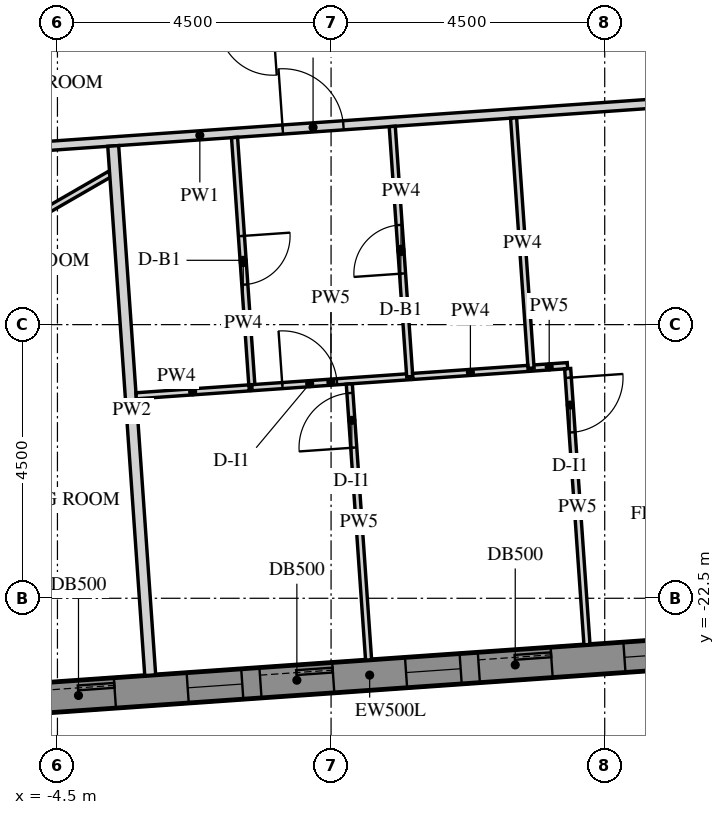
"""IFC4 building model, lengths in metres.
Left out: names, types, materials, properties, quantities, classifications, styles, units other than length and angle.
Written with IfcOpenShell. Run it as: python <this file> out.ifc"""

import sys

from ifc_helpers import new_model, si_unit, direction, frame, frame_2d, origin, place, context, subcontext, project, spatial, polyline, rectangle, outline, extrude, element, fill, save


model = new_model("IFC4")
c1 = context("Model", 3, precision=1e-05, world=origin(), true_north=direction((0.0, 1.0)))
c2 = subcontext(c1, "Body", "Model", "MODEL_VIEW")
j1 = project(units=[si_unit("LENGTHUNIT", "METRE"), si_unit("PLANEANGLEUNIT", "RADIAN")], contexts=[c1])
p1 = place(None, origin())
s1 = spatial("IfcSite", under=j1, at=p1, CompositionType="ELEMENT")
p2 = place(p1, origin())
s2 = spatial("IfcBuilding", under=s1, at=p2, CompositionType="ELEMENT")
p3 = place(p2, frame((0.0, 0.0, 314.7)))
s3 = spatial("IfcBuildingStorey", under=s2, at=p3, CompositionType="ELEMENT", Elevation=314.7)
p4 = place(p3, frame((-10.86, -24.567, -0.15), z_axis=(0.0, 0.0, 1.0), x_axis=(0.997564329317, 0.06975248292, 0.0)))
e1 = element("IfcWall", 1, at=p4, inside=s3, PredefinedType="SOLIDWALL", context=c2, shape_type="SweptSolid", body=[
    extrude(outline(polyline([(0.25, -0.25), (22.795, -0.25), (23.295, 0.25), (-0.25, 0.25), (0.25, -0.25)])), origin(), (0.0, 0.0, 1.0), 3.9),
])
p5 = place(p4, frame((1.323, 0.0, 1.05)))
e2 = element("IfcOpeningElement", 2, at=p5, cuts=e1, PredefinedType="OPENING", context=c2, shape_type="SweptSolid", body=[
    extrude(rectangle(XDim=0.9, YDim=1.5, at=frame_2d((0.45, 0.75))), frame((0.0, 0.26, 0.0), z_axis=(0.0, -1.0, 0.0), x_axis=(1.0, 0.0, 0.0)), (0.0, 0.0, 1.0), 0.52),
])
p6 = place(p4, frame((2.522, 0.0, 0.15)))
e3 = element("IfcOpeningElement", 3, at=p6, cuts=e1, PredefinedType="OPENING", context=c2, shape_type="SweptSolid", body=[
    extrude(rectangle(XDim=1.2, YDim=2.4, at=frame_2d((0.6, 1.2))), frame((0.0, 0.26, 0.0), z_axis=(0.0, -1.0, 0.0), x_axis=(1.0, 0.0, 0.0)), (0.0, 0.0, 1.0), 0.52),
])
p7 = place(p4, frame((4.922, 0.0, 1.05)))
e4 = element("IfcOpeningElement", 4, at=p7, cuts=e1, PredefinedType="OPENING", context=c2, shape_type="SweptSolid", body=[
    extrude(rectangle(XDim=0.9, YDim=1.5, at=frame_2d((0.45, 0.75))), frame((0.0, 0.26, 0.0), z_axis=(0.0, -1.0, 0.0), x_axis=(1.0, 0.0, 0.0)), (0.0, 0.0, 1.0), 0.52),
])
p8 = place(p4, frame((6.122, 0.0, 0.15)))
e5 = element("IfcOpeningElement", 5, at=p8, cuts=e1, PredefinedType="OPENING", context=c2, shape_type="SweptSolid", body=[
    extrude(rectangle(XDim=1.2, YDim=2.4, at=frame_2d((0.6, 1.2))), frame((0.0, 0.26, 0.0), z_axis=(0.0, -1.0, 0.0), x_axis=(1.0, 0.0, 0.0)), (0.0, 0.0, 1.0), 0.52),
])
p9 = place(p4, frame((8.522, 0.0, 1.05)))
e6 = element("IfcOpeningElement", 6, at=p9, cuts=e1, PredefinedType="OPENING", context=c2, shape_type="SweptSolid", body=[
    extrude(rectangle(XDim=0.9, YDim=1.5, at=frame_2d((0.45, 0.75))), frame((0.0, 0.26, 0.0), z_axis=(0.0, -1.0, 0.0), x_axis=(1.0, 0.0, 0.0)), (0.0, 0.0, 1.0), 0.52),
])
p10 = place(p4, frame((9.722, 0.0, 0.15)))
e7 = element("IfcOpeningElement", 7, at=p10, cuts=e1, PredefinedType="OPENING", context=c2, shape_type="SweptSolid", body=[
    extrude(rectangle(XDim=1.2, YDim=2.4, at=frame_2d((0.6, 1.2))), frame((0.0, 0.26, 0.0), z_axis=(0.0, -1.0, 0.0), x_axis=(1.0, 0.0, 0.0)), (0.0, 0.0, 1.0), 0.52),
])
p11 = place(p4, frame((12.122, 0.0, 1.05)))
e8 = element("IfcOpeningElement", 8, at=p11, cuts=e1, PredefinedType="OPENING", context=c2, shape_type="SweptSolid", body=[
    extrude(rectangle(XDim=0.9, YDim=1.5, at=frame_2d((0.45, 0.75))), frame((0.0, 0.26, 0.0), z_axis=(0.0, -1.0, 0.0), x_axis=(1.0, 0.0, 0.0)), (0.0, 0.0, 1.0), 0.52),
])
p12 = place(p4, frame((13.323, 0.0, 0.15)))
e9 = element("IfcOpeningElement", 9, at=p12, cuts=e1, PredefinedType="OPENING", context=c2, shape_type="SweptSolid", body=[
    extrude(rectangle(XDim=1.2, YDim=2.4, at=frame_2d((0.6, 1.2))), frame((0.0, 0.26, 0.0), z_axis=(0.0, -1.0, 0.0), x_axis=(1.0, 0.0, 0.0)), (0.0, 0.0, 1.0), 0.52),
])
p13 = place(p4, frame((15.722, 0.0, 1.05)))
e10 = element("IfcOpeningElement", 10, at=p13, cuts=e1, PredefinedType="OPENING", context=c2, shape_type="SweptSolid", body=[
    extrude(rectangle(XDim=0.9, YDim=1.5, at=frame_2d((0.45, 0.75))), frame((0.0, 0.26, 0.0), z_axis=(0.0, -1.0, 0.0), x_axis=(1.0, 0.0, 0.0)), (0.0, 0.0, 1.0), 0.52),
])
p14 = place(p4, frame((16.922, 0.0, 0.15)))
e11 = element("IfcOpeningElement", 11, at=p14, cuts=e1, PredefinedType="OPENING", context=c2, shape_type="SweptSolid", body=[
    extrude(rectangle(XDim=1.2, YDim=2.4, at=frame_2d((0.6, 1.2))), frame((0.0, 0.26, 0.0), z_axis=(0.0, -1.0, 0.0), x_axis=(1.0, 0.0, 0.0)), (0.0, 0.0, 1.0), 0.52),
])
p15 = place(p4, frame((19.323, 0.0, 1.05)))
e12 = element("IfcOpeningElement", 12, at=p15, cuts=e1, PredefinedType="OPENING", context=c2, shape_type="SweptSolid", body=[
    extrude(rectangle(XDim=0.9, YDim=1.5, at=frame_2d((0.45, 0.75))), frame((0.0, 0.26, 0.0), z_axis=(0.0, -1.0, 0.0), x_axis=(1.0, 0.0, 0.0)), (0.0, 0.0, 1.0), 0.52),
])
p16 = place(p4, frame((20.522, 0.0, 0.15)))
e13 = element("IfcOpeningElement", 13, at=p16, cuts=e1, PredefinedType="OPENING", context=c2, shape_type="SweptSolid", body=[
    extrude(rectangle(XDim=1.2, YDim=2.4, at=frame_2d((0.6, 1.2))), frame((0.0, 0.26, 0.0), z_axis=(0.0, -1.0, 0.0), x_axis=(1.0, 0.0, 0.0)), (0.0, 0.0, 1.0), 0.52),
])
p17 = place(p3, frame((-10.274, -15.454, 0.0), z_axis=(0.0, 0.0, 1.0), x_axis=(0.997564284069, 0.069753130035, 0.0)))
e14 = element("IfcWall", 14, at=p17, inside=s3, PredefinedType="PARTITIONING", context=c2, shape_type="SweptSolid", body=[
    extrude(rectangle(XDim=16.272, YDim=0.15, at=frame_2d((8.136, 0.0))), origin(), (0.0, 0.0, 1.0), 2.988),
])
p18 = place(p17, frame((9.503, 0.0, 0.0)))
e15 = element("IfcOpeningElement", 15, at=p18, cuts=e14, PredefinedType="OPENING", context=c2, shape_type="SweptSolid", body=[
    extrude(rectangle(XDim=1.0, YDim=2.1, at=frame_2d((0.5, 1.05))), frame((0.0, 0.085, 0.0), z_axis=(0.0, -1.0, 0.0), x_axis=(1.0, 0.0, 0.0)), (0.0, 0.0, 1.0), 0.17),
])
p19 = place(p3, frame((6.551, -12.473, 0.0), z_axis=(0.0, 0.0, 1.0), x_axis=(-0.997563421853, -0.069765459797, 0.0)))
e16 = element("IfcWall", 16, at=p19, inside=s3, PredefinedType="PARTITIONING", context=c2, shape_type="SweptSolid", body=[
    extrude(rectangle(XDim=15.95, YDim=0.15, at=frame_2d((7.975, 0.0))), origin(), (0.0, 0.0, 1.0), 2.988),
])
p20 = place(p19, frame((7.525, 0.0, 0.0)))
e17 = element("IfcOpeningElement", 17, at=p20, cuts=e16, PredefinedType="OPENING", context=c2, shape_type="SweptSolid", body=[
    extrude(rectangle(XDim=0.9, YDim=2.1, at=frame_2d((0.45, 1.05))), frame((0.0, 0.085, 0.0), z_axis=(0.0, -1.0, 0.0), x_axis=(1.0, 0.0, 0.0)), (0.0, 0.0, 1.0), 0.17),
])
p21 = place(p3, frame((-3.641, -15.525, 0.0), z_axis=(0.0, 0.0, 1.0), x_axis=(-0.866026229868, -0.499998569178, 0.0)))
e18 = element("IfcWall", 18, at=p21, inside=s3, PredefinedType="PARTITIONING", context=c2, shape_type="SweptSolid", body=[
    extrude(rectangle(XDim=9.185, YDim=0.1, at=frame_2d((4.592, 0.0))), origin(), (0.0, 0.0, 1.0), 2.988),
])
p22 = place(p3, frame((-2.974, -23.765, 0.0), z_axis=(0.0, 0.0, 1.0), x_axis=(-0.06975756604, 0.997563973878, 0.0)))
e19 = element("IfcWall", 19, at=p22, inside=s3, PredefinedType="PARTITIONING", context=c2, shape_type="SweptSolid", body=[
    extrude(rectangle(XDim=8.725, YDim=0.18, at=frame_2d((4.363, 0.0))), origin(), (0.0, 0.0, 1.0), 2.988),
])
p23 = place(p3, frame((3.287, -18.716, 0.0), z_axis=(0.0, 0.0, 1.0), x_axis=(0.997564613391, 0.069748420123, 0.0)))
e20 = element("IfcWall", 20, at=p23, inside=s3, PredefinedType="PARTITIONING", context=c2, shape_type="SweptSolid", body=[
    extrude(rectangle(XDim=0.602, YDim=0.1, at=frame_2d((0.301, 0.0))), origin(), (0.0, 0.0, 1.0), 2.988),
])
p24 = place(p3, frame((3.891, -18.724, 0.0), z_axis=(0.0, 0.0, 1.0), x_axis=(0.06975224022, -0.997564346288, 0.0)))
e21 = element("IfcWall", 21, at=p24, inside=s3, PredefinedType="PARTITIONING", context=c2, shape_type="SweptSolid", body=[
    extrude(rectangle(XDim=4.55, YDim=0.1, at=frame_2d((2.275, 0.0))), origin(), (0.0, 0.0, 1.0), 2.988),
])
p25 = place(p24, frame((0.15, 0.0, 0.0)))
e22 = element("IfcOpeningElement", 22, at=p25, cuts=e21, PredefinedType="OPENING", context=c2, shape_type="SweptSolid", body=[
    extrude(rectangle(XDim=0.9, YDim=2.1, at=frame_2d((0.45, 1.05))), frame((0.0, 0.06, 0.0), z_axis=(0.0, -1.0, 0.0), x_axis=(1.0, 0.0, 0.0)), (0.0, 0.0, 1.0), 0.12),
])
p26 = place(p3, frame((3.001, -14.601, 0.0), z_axis=(0.0, 0.0, 1.0), x_axis=(0.06972428516, -0.997566300583, 0.0)))
e23 = element("IfcWall", 23, at=p26, inside=s3, PredefinedType="PARTITIONING", context=c2, shape_type="SweptSolid", body=[
    extrude(rectangle(XDim=4.125, YDim=0.1, at=frame_2d((2.062, 0.0))), origin(), (0.0, 0.0, 1.0), 2.988),
])
p27 = place(p3, frame((-1.588, -14.922, 0.0), z_axis=(0.0, 0.0, 1.0), x_axis=(0.069720168556, -0.997566588302, 0.0)))
e24 = element("IfcWall", 24, at=p27, inside=s3, PredefinedType="PARTITIONING", context=c2, shape_type="SweptSolid", body=[
    extrude(rectangle(XDim=4.125, YDim=0.1, at=frame_2d((2.062, 0.0))), origin(), (0.0, 0.0, 1.0), 2.988),
])
p28 = place(p27, frame((1.625, 0.0, 0.0)))
e25 = element("IfcOpeningElement", 25, at=p28, cuts=e24, PredefinedType="OPENING", context=c2, shape_type="SweptSolid", body=[
    extrude(rectangle(XDim=0.8, YDim=2.1, at=frame_2d((0.4, 1.05))), frame((0.0, 0.06, 0.0), z_axis=(0.0, -1.0, 0.0), x_axis=(1.0, 0.0, 0.0)), (0.0, 0.0, 1.0), 0.12),
])
p29 = place(p3, frame((-1.302, -19.037, 0.0), z_axis=(0.0, 0.0, 1.0), x_axis=(0.997564189086, 0.06975448841, 0.0)))
e26 = element("IfcWall", 26, at=p29, inside=s3, PredefinedType="PARTITIONING", context=c2, shape_type="SweptSolid", body=[
    extrude(rectangle(XDim=2.604, YDim=0.1, at=frame_2d((1.302, 0.0))), origin(), (0.0, 0.0, 1.0), 2.988),
])
p30 = place(p29, frame((0.502, 0.0, 0.0)))
e27 = element("IfcOpeningElement", 27, at=p30, cuts=e26, PredefinedType="OPENING", context=c2, shape_type="SweptSolid", body=[
    extrude(rectangle(XDim=0.9, YDim=2.1, at=frame_2d((0.45, 1.05))), frame((0.0, 0.06, 0.0), z_axis=(0.0, -1.0, 0.0), x_axis=(1.0, 0.0, 0.0)), (0.0, 0.0, 1.0), 0.12),
])
p31 = place(p3, frame((1.294, -18.856, 0.0), z_axis=(0.0, 0.0, 1.0), x_axis=(-0.069720168556, 0.997566588302, 0.0)))
e28 = element("IfcWall", 28, at=p31, inside=s3, PredefinedType="PARTITIONING", context=c2, shape_type="SweptSolid", body=[
    extrude(rectangle(XDim=4.125, YDim=0.1, at=frame_2d((2.062, 0.0))), origin(), (0.0, 0.0, 1.0), 2.988),
])
p32 = place(p31, frame((1.7, 0.0, 0.0)))
e29 = element("IfcOpeningElement", 29, at=p32, cuts=e28, PredefinedType="OPENING", context=c2, shape_type="SweptSolid", body=[
    extrude(rectangle(XDim=0.8, YDim=2.1, at=frame_2d((0.4, 1.05))), frame((0.0, 0.06, 0.0), z_axis=(0.0, -1.0, 0.0), x_axis=(1.0, 0.0, 0.0)), (0.0, 0.0, 1.0), 0.12),
])
p33 = place(p3, frame((-3.205, -19.17, 0.0), z_axis=(0.0, 0.0, 1.0), x_axis=(0.99755494671, 0.069886538722, 0.0)))
e30 = element("IfcWall", 30, at=p33, inside=s3, PredefinedType="PARTITIONING", context=c2, shape_type="SweptSolid", body=[
    extrude(rectangle(XDim=1.862, YDim=0.1, at=frame_2d((0.931, 0.0))), origin(), (0.0, 0.0, 1.0), 2.988),
])
p34 = place(p3, frame((0.617, -23.514, 0.0), z_axis=(0.0, 0.0, 1.0), x_axis=(-0.0697559739, 0.997564085212, 0.0)))
e31 = element("IfcWall", 31, at=p34, inside=s3, PredefinedType="PARTITIONING", context=c2, shape_type="SweptSolid", body=[
    extrude(rectangle(XDim=4.55, YDim=0.1, at=frame_2d((2.275, 0.0))), origin(), (0.0, 0.0, 1.0), 2.988),
])
p35 = place(p34, frame((3.5, 0.0, 0.0)))
e32 = element("IfcOpeningElement", 32, at=p35, cuts=e31, PredefinedType="OPENING", context=c2, shape_type="SweptSolid", body=[
    extrude(rectangle(XDim=0.9, YDim=2.1, at=frame_2d((0.45, 1.05))), frame((0.0, 0.06, 0.0), z_axis=(0.0, -1.0, 0.0), x_axis=(1.0, 0.0, 0.0)), (0.0, 0.0, 1.0), 0.12),
])
p36 = place(p3, frame((3.239, -18.72, 0.0), z_axis=(0.0, 0.0, 1.0), x_axis=(-0.997563261324, -0.069767755139, 0.0)))
e33 = element("IfcWall", 33, at=p36, inside=s3, PredefinedType="PARTITIONING", context=c2, shape_type="SweptSolid", body=[
    extrude(rectangle(XDim=1.9, YDim=0.1, at=frame_2d((0.95, 0.0))), origin(), (0.0, 0.0, 1.0), 2.988),
])
p37 = place(p8, frame((0.0, 0.175, 0.0)))
e34 = element("IfcDoor", 34, at=p37, inside=s3, OperationType="SLIDING_TO_LEFT", PredefinedType="DOOR", context=c2, shape_type="SweptSolid", body=[
    extrude(rectangle(XDim=1.2, YDim=2.4, at=frame_2d((0.6, 1.2))), frame((0.0, 0.025, 0.0), z_axis=(0.0, -1.0, 0.0), x_axis=(1.0, 0.0, 0.0)), (0.0, 0.0, 1.0), 0.05),
])
fill(e5, e34)
p38 = place(p9, frame((0.0, 0.18, 0.0)))
e35 = element("IfcWindow", 35, at=p38, inside=s3, PartitioningType="SINGLE_PANEL", PredefinedType="WINDOW", context=c2, shape_type="SweptSolid", body=[
    extrude(rectangle(XDim=0.9, YDim=1.5, at=frame_2d((0.45, 0.75))), frame((0.0, 0.03, 0.0), z_axis=(0.0, -1.0, 0.0), x_axis=(1.0, 0.0, 0.0)), (0.0, 0.0, 1.0), 0.06),
])
fill(e6, e35)
p39 = place(p10, frame((0.0, 0.175, 0.0)))
e36 = element("IfcDoor", 36, at=p39, inside=s3, OperationType="SLIDING_TO_LEFT", PredefinedType="DOOR", context=c2, shape_type="SweptSolid", body=[
    extrude(rectangle(XDim=1.2, YDim=2.4, at=frame_2d((0.6, 1.2))), frame((0.0, 0.025, 0.0), z_axis=(0.0, -1.0, 0.0), x_axis=(1.0, 0.0, 0.0)), (0.0, 0.0, 1.0), 0.05),
])
fill(e7, e36)
p40 = place(p11, frame((0.0, 0.18, 0.0)))
e37 = element("IfcWindow", 37, at=p40, inside=s3, PartitioningType="SINGLE_PANEL", PredefinedType="WINDOW", context=c2, shape_type="SweptSolid", body=[
    extrude(rectangle(XDim=0.9, YDim=1.5, at=frame_2d((0.45, 0.75))), frame((0.0, 0.03, 0.0), z_axis=(0.0, -1.0, 0.0), x_axis=(1.0, 0.0, 0.0)), (0.0, 0.0, 1.0), 0.06),
])
fill(e8, e37)
p41 = place(p12, frame((0.0, 0.175, 0.0)))
e38 = element("IfcDoor", 38, at=p41, inside=s3, OperationType="SLIDING_TO_LEFT", PredefinedType="DOOR", context=c2, shape_type="SweptSolid", body=[
    extrude(rectangle(XDim=1.2, YDim=2.4, at=frame_2d((0.6, 1.2))), frame((0.0, 0.025, 0.0), z_axis=(0.0, -1.0, 0.0), x_axis=(1.0, 0.0, 0.0)), (0.0, 0.0, 1.0), 0.05),
])
fill(e9, e38)
p42 = place(p13, frame((0.0, 0.18, 0.0)))
e39 = element("IfcWindow", 39, at=p42, inside=s3, PartitioningType="SINGLE_PANEL", PredefinedType="WINDOW", context=c2, shape_type="SweptSolid", body=[
    extrude(rectangle(XDim=0.9, YDim=1.5, at=frame_2d((0.45, 0.75))), frame((0.0, 0.03, 0.0), z_axis=(0.0, -1.0, 0.0), x_axis=(1.0, 0.0, 0.0)), (0.0, 0.0, 1.0), 0.06),
])
fill(e10, e39)
p43 = place(p18, origin())
e40 = element("IfcDoor", 40, at=p43, inside=s3, OperationType="SINGLE_SWING_RIGHT", PredefinedType="DOOR", context=c2, shape_type="SweptSolid", body=[
    extrude(rectangle(XDim=1.0, YDim=2.1, at=frame_2d((0.5, 1.05))), frame((0.0, 0.025, 0.0), z_axis=(0.0, -1.0, 0.0), x_axis=(1.0, 0.0, 0.0)), (0.0, 0.0, 1.0), 0.05),
])
fill(e15, e40)
p44 = place(p28, origin())
e41 = element("IfcDoor", 41, at=p44, inside=s3, OperationType="SINGLE_SWING_RIGHT", PredefinedType="DOOR", context=c2, shape_type="SweptSolid", body=[
    extrude(rectangle(XDim=0.8, YDim=2.1, at=frame_2d((0.4, 1.05))), frame((0.0, 0.025, 0.0), z_axis=(0.0, -1.0, 0.0), x_axis=(1.0, 0.0, 0.0)), (0.0, 0.0, 1.0), 0.05),
])
fill(e25, e41)
p45 = place(p30, origin())
e42 = element("IfcDoor", 42, at=p45, inside=s3, OperationType="SINGLE_SWING_LEFT", PredefinedType="DOOR", context=c2, shape_type="SweptSolid", body=[
    extrude(rectangle(XDim=0.9, YDim=2.1, at=frame_2d((0.45, 1.05))), frame((0.0, 0.025, 0.0), z_axis=(0.0, -1.0, 0.0), x_axis=(1.0, 0.0, 0.0)), (0.0, 0.0, 1.0), 0.05),
])
fill(e27, e42)
p46 = place(p35, origin())
e43 = element("IfcDoor", 43, at=p46, inside=s3, OperationType="SINGLE_SWING_RIGHT", PredefinedType="DOOR", context=c2, shape_type="SweptSolid", body=[
    extrude(rectangle(XDim=0.9, YDim=2.1, at=frame_2d((0.45, 1.05))), frame((0.0, 0.025, 0.0), z_axis=(0.0, -1.0, 0.0), x_axis=(1.0, 0.0, 0.0)), (0.0, 0.0, 1.0), 0.05),
])
fill(e32, e43)
p47 = place(p25, origin())
e44 = element("IfcDoor", 44, at=p47, inside=s3, OperationType="SINGLE_SWING_RIGHT", PredefinedType="DOOR", context=c2, shape_type="SweptSolid", body=[
    extrude(rectangle(XDim=0.9, YDim=2.1, at=frame_2d((0.45, 1.05))), frame((0.0, 0.025, 0.0), z_axis=(0.0, -1.0, 0.0), x_axis=(1.0, 0.0, 0.0)), (0.0, 0.0, 1.0), 0.05),
])
fill(e22, e44)
p48 = place(p32, origin())
e45 = element("IfcDoor", 45, at=p48, inside=s3, OperationType="SINGLE_SWING_LEFT", PredefinedType="DOOR", context=c2, shape_type="SweptSolid", body=[
    extrude(rectangle(XDim=0.8, YDim=2.1, at=frame_2d((0.4, 1.05))), frame((0.0, 0.025, 0.0), z_axis=(0.0, -1.0, 0.0), x_axis=(1.0, 0.0, 0.0)), (0.0, 0.0, 1.0), 0.05),
])
fill(e29, e45)
save(model, sys.argv[1])
